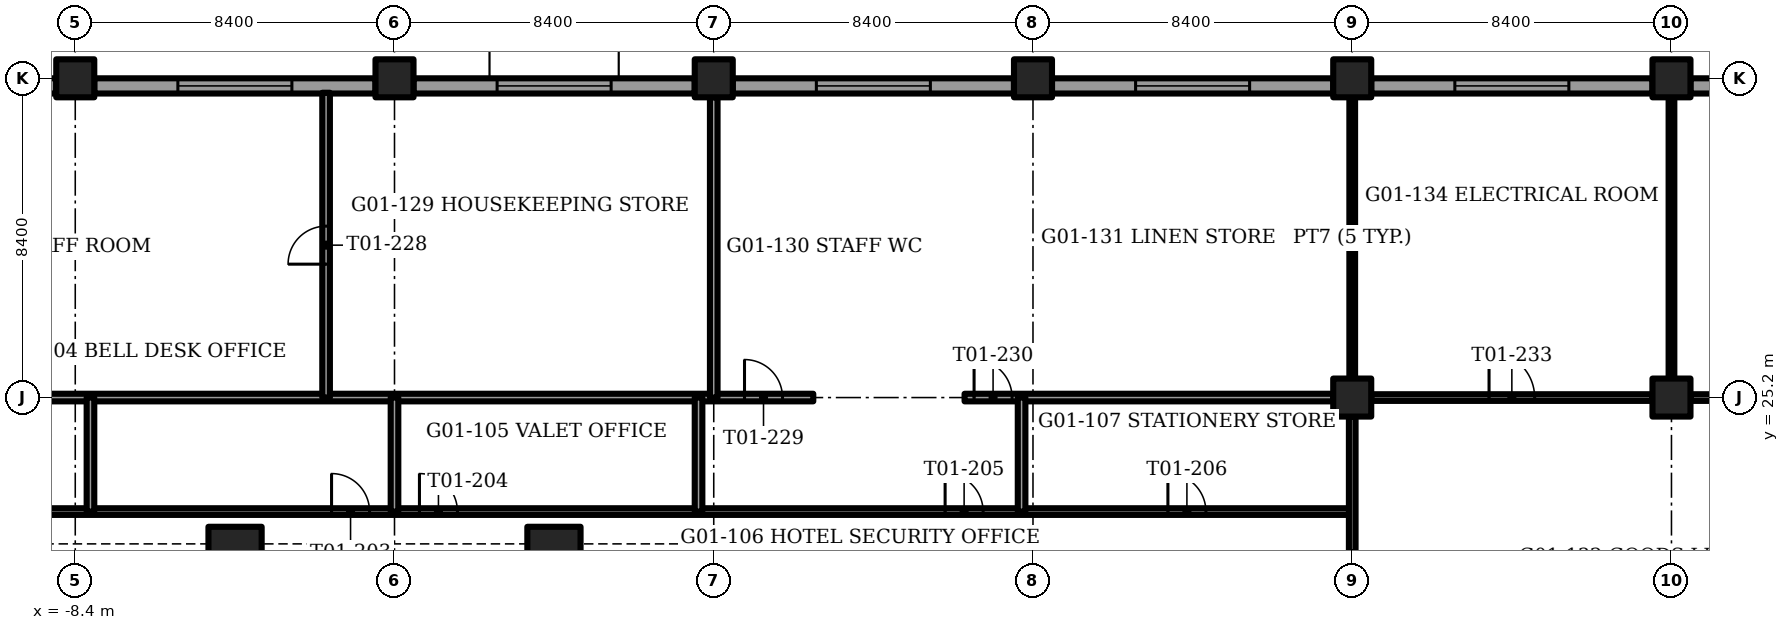
"""IFC4 building model, lengths in metres.
Left out: names, types, materials, properties, quantities, classifications, styles, units other than length and angle.
Written with IfcOpenShell. Run it as: python <this file> out.ifc"""

import sys

from ifc_helpers import new_model, si_unit, direction, frame, frame_2d, origin, origin_2d, place, context, subcontext, project, spatial, rectangle, circle, extrude, element, fill, save


model = new_model("IFC4")
c1 = context("Model", 3, precision=1e-05, world=origin(), true_north=direction((0.0, 1.0)))
c2 = subcontext(c1, "Body", "Model", "MODEL_VIEW")
j1 = project(units=[si_unit("LENGTHUNIT", "METRE"), si_unit("PLANEANGLEUNIT", "RADIAN")], contexts=[c1])
p1 = place(None, origin())
s1 = spatial("IfcSite", under=j1, at=p1, CompositionType="ELEMENT")
p2 = place(p1, origin())
s2 = spatial("IfcBuilding", under=s1, at=p2, CompositionType="ELEMENT")
p3 = place(p2, frame((0.0, 0.0, 6.0)))
s3 = spatial("IfcBuildingStorey", under=s2, at=p3, CompositionType="ELEMENT", Elevation=6.0)
for number, where, z_axis, x_axis in (
    (1, (-8.4, 33.6, -0.35), (0.0, 0.0, 1.0), (1.0, 0.0, 0.0)),
    (2, (0.0, 33.6, -0.35), (0.0, 0.0, 1.0), (1.0, 0.0, 0.0)),
    (3, (8.4, 33.6, -0.35), (0.0, 0.0, 1.0), (1.0, 0.0, 0.0)),
    (4, (16.8, 33.6, -0.35), (0.0, 0.0, 1.0), (1.0, 0.0, 0.0)),
    (5, (25.2, 25.2, -0.35), (0.0, 0.0, 1.0), (1.0, 0.0, 0.0)),
    (6, (25.2, 33.6, -0.35), (0.0, 0.0, 1.0), (1.0, 0.0, 0.0)),
    (7, (33.6, 25.2, -0.35), (0.0, 0.0, 1.0), (1.0, 0.0, 0.0)),
    (8, (33.6, 33.6, -0.35), (0.0, 0.0, 1.0), (1.0, 0.0, 0.0)),
):
    element("IfcColumn", number, at=place(p3, frame(where, z_axis=z_axis, x_axis=x_axis)), inside=s3, PredefinedType="COLUMN", context=c2, shape_type="SweptSolid", body=[
        extrude(rectangle(XDim=1.0, YDim=1.0, at=origin_2d()), origin(), (0.0, 0.0, 1.0), 4.0),
    ])
p4 = place(p3, frame((12.051, 20.872, -1.2), z_axis=(0.0, 0.0, 1.0), x_axis=(1.0, 0.0, 0.0)))
e9 = element("IfcColumn", 9, at=p4, inside=s3, PredefinedType="COLUMN", context=c2, shape_type="SweptSolid", body=[
    extrude(circle(Radius=0.7, at=origin_2d()), origin(), (0.0, 0.0, 1.0), 4.0),
])
for number, where, z_axis, x_axis in (
    (10, (4.195, 21.1, -1.2), (0.0, 0.0, 1.0), (1.0, 0.0, 0.0)),
    (11, (-4.195, 21.1, -1.2), (0.0, 0.0, 1.0), (1.0, 0.0, 0.0)),
):
    element("IfcColumn", number, at=place(p3, frame(where, z_axis=z_axis, x_axis=x_axis)), inside=s3, PredefinedType="COLUMN", context=c2, shape_type="SweptSolid", body=[
        extrude(rectangle(XDim=1.4, YDim=1.4, at=origin_2d()), origin(), (0.0, 0.0, 1.0), 4.0),
    ])
p5 = place(p3, frame((-16.3, 33.4, 0.0), z_axis=(0.0, 0.0, 1.0), x_axis=(1.0, 0.0, 0.0)))
e12 = element("IfcWall", 12, at=p5, inside=s3, PredefinedType="SOLIDWALL", context=c2, shape_type="SweptSolid", body=[
    extrude(rectangle(XDim=7.4, YDim=0.4, at=frame_2d((3.7, 0.0))), origin(), (0.0, 0.0, 1.0), 3.65),
])
p6 = place(p5, frame((2.2, 0.0, 1.0)))
e13 = element("IfcOpeningElement", 13, at=p6, cuts=e12, PredefinedType="OPENING", context=c2, shape_type="SweptSolid", body=[
    extrude(rectangle(XDim=3.0, YDim=2.2, at=frame_2d((1.5, 1.1))), frame((0.0, 0.2, 0.0), z_axis=(0.0, -1.0, 0.0), x_axis=(1.0, 0.0, 0.0)), (0.0, 0.0, 1.0), 0.4),
])
p7 = place(p3, frame((-7.9, 33.4, 0.0), z_axis=(0.0, 0.0, 1.0), x_axis=(1.0, 0.0, 0.0)))
e14 = element("IfcWall", 14, at=p7, inside=s3, PredefinedType="SOLIDWALL", context=c2, shape_type="SweptSolid", body=[
    extrude(rectangle(XDim=7.4, YDim=0.4, at=frame_2d((3.7, 0.0))), origin(), (0.0, 0.0, 1.0), 3.65),
])
p8 = place(p7, frame((2.2, 0.0, 1.0)))
e15 = element("IfcOpeningElement", 15, at=p8, cuts=e14, PredefinedType="OPENING", context=c2, shape_type="SweptSolid", body=[
    extrude(rectangle(XDim=3.0, YDim=2.2, at=frame_2d((1.5, 1.1))), frame((0.0, 0.2, 0.0), z_axis=(0.0, -1.0, 0.0), x_axis=(1.0, 0.0, 0.0)), (0.0, 0.0, 1.0), 0.4),
])
p9 = place(p3, frame((0.5, 33.4, 0.0), z_axis=(0.0, 0.0, 1.0), x_axis=(1.0, 0.0, 0.0)))
e16 = element("IfcWall", 16, at=p9, inside=s3, PredefinedType="SOLIDWALL", context=c2, shape_type="SweptSolid", body=[
    extrude(rectangle(XDim=7.4, YDim=0.4, at=frame_2d((3.7, 0.0))), origin(), (0.0, 0.0, 1.0), 3.65),
])
p10 = place(p9, frame((2.2, 0.0, 1.0)))
e17 = element("IfcOpeningElement", 17, at=p10, cuts=e16, PredefinedType="OPENING", context=c2, shape_type="SweptSolid", body=[
    extrude(rectangle(XDim=3.0, YDim=2.2, at=frame_2d((1.5, 1.1))), frame((0.0, 0.2, 0.0), z_axis=(0.0, -1.0, 0.0), x_axis=(1.0, 0.0, 0.0)), (0.0, 0.0, 1.0), 0.4),
])
p11 = place(p3, frame((8.9, 33.4, 0.0), z_axis=(0.0, 0.0, 1.0), x_axis=(1.0, 0.0, 0.0)))
e18 = element("IfcWall", 18, at=p11, inside=s3, PredefinedType="SOLIDWALL", context=c2, shape_type="SweptSolid", body=[
    extrude(rectangle(XDim=7.4, YDim=0.4, at=frame_2d((3.7, 0.0))), origin(), (0.0, 0.0, 1.0), 3.65),
])
p12 = place(p11, frame((2.2, 0.0, 1.0)))
e19 = element("IfcOpeningElement", 19, at=p12, cuts=e18, PredefinedType="OPENING", context=c2, shape_type="SweptSolid", body=[
    extrude(rectangle(XDim=3.0, YDim=2.2, at=frame_2d((1.5, 1.1))), frame((0.0, 0.2, 0.0), z_axis=(0.0, -1.0, 0.0), x_axis=(1.0, 0.0, 0.0)), (0.0, 0.0, 1.0), 0.4),
])
p13 = place(p3, frame((17.3, 33.4, 0.0), z_axis=(0.0, 0.0, 1.0), x_axis=(1.0, 0.0, 0.0)))
e20 = element("IfcWall", 20, at=p13, inside=s3, PredefinedType="SOLIDWALL", context=c2, shape_type="SweptSolid", body=[
    extrude(rectangle(XDim=7.4, YDim=0.4, at=frame_2d((3.7, 0.0))), origin(), (0.0, 0.0, 1.0), 3.65),
])
p14 = place(p13, frame((2.2, 0.0, 1.0)))
e21 = element("IfcOpeningElement", 21, at=p14, cuts=e20, PredefinedType="OPENING", context=c2, shape_type="SweptSolid", body=[
    extrude(rectangle(XDim=3.0, YDim=2.2, at=frame_2d((1.5, 1.1))), frame((0.0, 0.2, 0.0), z_axis=(0.0, -1.0, 0.0), x_axis=(1.0, 0.0, 0.0)), (0.0, 0.0, 1.0), 0.4),
])
p15 = place(p3, frame((25.7, 33.4, 0.0), z_axis=(0.0, 0.0, 1.0), x_axis=(1.0, 0.0, 0.0)))
e22 = element("IfcWall", 22, at=p15, inside=s3, PredefinedType="SOLIDWALL", context=c2, shape_type="SweptSolid", body=[
    extrude(rectangle(XDim=7.4, YDim=0.4, at=frame_2d((3.7, 0.0))), origin(), (0.0, 0.0, 1.0), 3.65),
])
p16 = place(p15, frame((2.2, 0.0, 1.0)))
e23 = element("IfcOpeningElement", 23, at=p16, cuts=e22, PredefinedType="OPENING", context=c2, shape_type="SweptSolid", body=[
    extrude(rectangle(XDim=3.0, YDim=2.2, at=frame_2d((1.5, 1.1))), frame((0.0, 0.2, 0.0), z_axis=(0.0, -1.0, 0.0), x_axis=(1.0, 0.0, 0.0)), (0.0, 0.0, 1.0), 0.4),
])
p17 = place(p3, frame((34.1, 33.4, 0.0), z_axis=(0.0, 0.0, 1.0), x_axis=(1.0, 0.0, 0.0)))
e24 = element("IfcWall", 24, at=p17, inside=s3, PredefinedType="SOLIDWALL", context=c2, shape_type="SweptSolid", body=[
    extrude(rectangle(XDim=7.4, YDim=0.4, at=frame_2d((3.7, 0.0))), origin(), (0.0, 0.0, 1.0), 3.65),
])
p18 = place(p17, frame((2.2, 0.0, 1.0)))
e25 = element("IfcOpeningElement", 25, at=p18, cuts=e24, PredefinedType="OPENING", context=c2, shape_type="SweptSolid", body=[
    extrude(rectangle(XDim=3.0, YDim=2.2, at=frame_2d((1.5, 1.1))), frame((0.0, 0.2, 0.0), z_axis=(0.0, -1.0, 0.0), x_axis=(1.0, 0.0, 0.0)), (0.0, 0.0, 1.0), 0.4),
])
p19 = place(p3, frame((-17.0, 22.2, 0.0), z_axis=(0.0, 0.0, 1.0), x_axis=(1.0, 0.0, 0.0)))
e26 = element("IfcWall", 26, at=p19, inside=s3, PredefinedType="PARTITIONING", context=c2, shape_type="SweptSolid", body=[
    extrude(rectangle(XDim=42.2, YDim=0.175, at=frame_2d((21.1, 0.0))), origin(), (0.0, 0.0, 1.0), 3.65),
])
p20 = place(p19, frame((1.262, 0.0, 0.0)))
e27 = element("IfcOpeningElement", 27, at=p20, cuts=e26, PredefinedType="OPENING", context=c2, shape_type="SweptSolid", body=[
    extrude(rectangle(XDim=1.0, YDim=2.1, at=frame_2d((0.5, 1.05))), frame((0.0, 0.087, 0.0), z_axis=(0.0, -1.0, 0.0), x_axis=(1.0, 0.0, 0.0)), (0.0, 0.0, 1.0), 0.175),
])
p21 = place(p19, frame((15.344, 0.0, 0.0)))
e28 = element("IfcOpeningElement", 28, at=p21, cuts=e26, PredefinedType="OPENING", context=c2, shape_type="SweptSolid", body=[
    extrude(rectangle(XDim=1.0, YDim=2.1, at=frame_2d((0.5, 1.05))), frame((0.0, 0.087, 0.0), z_axis=(0.0, -1.0, 0.0), x_axis=(1.0, 0.0, 0.0)), (0.0, 0.0, 1.0), 0.175),
])
p22 = place(p19, frame((17.656, 0.0, 0.0)))
e29 = element("IfcOpeningElement", 29, at=p22, cuts=e26, PredefinedType="OPENING", context=c2, shape_type="SweptSolid", body=[
    extrude(rectangle(XDim=1.0, YDim=2.1, at=frame_2d((0.5, 1.05))), frame((0.0, 0.087, 0.0), z_axis=(0.0, -1.0, 0.0), x_axis=(1.0, 0.0, 0.0)), (0.0, 0.0, 1.0), 0.175),
])
p23 = place(p19, frame((31.488, 0.0, 0.0)))
e30 = element("IfcOpeningElement", 30, at=p23, cuts=e26, PredefinedType="OPENING", context=c2, shape_type="SweptSolid", body=[
    extrude(rectangle(XDim=1.0, YDim=2.1, at=frame_2d((0.5, 1.05))), frame((0.0, 0.087, 0.0), z_axis=(0.0, -1.0, 0.0), x_axis=(1.0, 0.0, 0.0)), (0.0, 0.0, 1.0), 0.175),
])
p24 = place(p19, frame((37.35, 0.0, 0.0)))
e31 = element("IfcOpeningElement", 31, at=p24, cuts=e26, PredefinedType="OPENING", context=c2, shape_type="SweptSolid", body=[
    extrude(rectangle(XDim=1.0, YDim=2.1, at=frame_2d((0.5, 1.05))), frame((0.0, 0.087, 0.0), z_axis=(0.0, -1.0, 0.0), x_axis=(1.0, 0.0, 0.0)), (0.0, 0.0, 1.0), 0.175),
])
p25 = place(p3, frame((25.7, 25.2, 0.0), z_axis=(0.0, 0.0, 1.0), x_axis=(1.0, 0.0, 0.0)))
e32 = element("IfcWall", 32, at=p25, inside=s3, PredefinedType="PARTITIONING", context=c2, shape_type="SweptSolid", body=[
    extrude(rectangle(XDim=7.4, YDim=0.175, at=frame_2d((3.7, 0.0))), origin(), (0.0, 0.0, 1.0), 3.65),
])
p26 = place(p25, frame((3.1, 0.0, 0.0)))
e33 = element("IfcOpeningElement", 33, at=p26, cuts=e32, PredefinedType="OPENING", context=c2, shape_type="SweptSolid", body=[
    extrude(rectangle(XDim=1.2, YDim=2.1, at=frame_2d((0.6, 1.05))), frame((0.0, 0.087, 0.0), z_axis=(0.0, -1.0, 0.0), x_axis=(1.0, 0.0, 0.0)), (0.0, 0.0, 1.0), 0.175),
])
p27 = place(p3, frame((34.1, 25.2, 0.0), z_axis=(0.0, 0.0, 1.0), x_axis=(1.0, 0.0, 0.0)))
e34 = element("IfcWall", 34, at=p27, inside=s3, PredefinedType="PARTITIONING", context=c2, shape_type="SweptSolid", body=[
    extrude(rectangle(XDim=7.4, YDim=0.175, at=frame_2d((3.7, 0.0))), origin(), (0.0, 0.0, 1.0), 3.65),
])
p28 = place(p27, frame((3.1, 0.0, 0.0)))
e35 = element("IfcOpeningElement", 35, at=p28, cuts=e34, PredefinedType="OPENING", context=c2, shape_type="SweptSolid", body=[
    extrude(rectangle(XDim=1.2, YDim=2.1, at=frame_2d((0.6, 1.05))), frame((0.0, 0.087, 0.0), z_axis=(0.0, -1.0, 0.0), x_axis=(1.0, 0.0, 0.0)), (0.0, 0.0, 1.0), 0.175),
])
p29 = place(p3, frame((25.2, 17.3, 0.0), z_axis=(0.0, 0.0, 1.0), x_axis=(0.0, 1.0, 0.0)))
e36 = element("IfcWall", 36, at=p29, inside=s3, PredefinedType="PARTITIONING", context=c2, shape_type="SweptSolid", body=[
    extrude(rectangle(XDim=7.4, YDim=0.175, at=frame_2d((3.7, 0.0))), origin(), (0.0, 0.0, 1.0), 3.65),
])
p30 = place(p29, frame((2.275, 0.0, 0.0)))
e37 = element("IfcOpeningElement", 37, at=p30, cuts=e36, PredefinedType="OPENING", context=c2, shape_type="SweptSolid", body=[
    extrude(rectangle(XDim=1.6, YDim=2.1, at=frame_2d((0.8, 1.05))), frame((0.0, 0.087, 0.0), z_axis=(0.0, -1.0, 0.0), x_axis=(1.0, 0.0, 0.0)), (0.0, 0.0, 1.0), 0.175),
])
p31 = place(p3, frame((-17.0, 25.2, 0.0), z_axis=(0.0, 0.0, 1.0), x_axis=(1.0, 0.0, 0.0)))
e38 = element("IfcWall", 38, at=p31, inside=s3, PredefinedType="PARTITIONING", context=c2, shape_type="SweptSolid", body=[
    extrude(rectangle(XDim=28.019, YDim=0.2, at=frame_2d((14.01, 0.0))), origin(), (0.0, 0.0, 1.0), 3.65),
])
p32 = place(p31, frame((26.209, 0.0, 0.0)))
e39 = element("IfcOpeningElement", 39, at=p32, cuts=e38, PredefinedType="OPENING", context=c2, shape_type="SweptSolid", body=[
    extrude(rectangle(XDim=1.0, YDim=2.1, at=frame_2d((0.5, 1.05))), frame((0.0, 0.1, 0.0), z_axis=(0.0, -1.0, 0.0), x_axis=(1.0, 0.0, 0.0)), (0.0, 0.0, 1.0), 0.2),
])
p33 = place(p3, frame((15.0, 25.2, 0.0), z_axis=(0.0, 0.0, 1.0), x_axis=(1.0, 0.0, 0.0)))
e40 = element("IfcWall", 40, at=p33, inside=s3, PredefinedType="PARTITIONING", context=c2, shape_type="SweptSolid", body=[
    extrude(rectangle(XDim=9.7, YDim=0.2, at=frame_2d((4.85, 0.0))), origin(), (0.0, 0.0, 1.0), 3.65),
])
p34 = place(p33, frame((0.25, 0.0, 0.0)))
e41 = element("IfcOpeningElement", 41, at=p34, cuts=e40, PredefinedType="OPENING", context=c2, shape_type="SweptSolid", body=[
    extrude(rectangle(XDim=1.0, YDim=2.1, at=frame_2d((0.5, 1.05))), frame((0.0, 0.1, 0.0), z_axis=(0.0, -1.0, 0.0), x_axis=(1.0, 0.0, 0.0)), (0.0, 0.0, 1.0), 0.2),
])
p35 = place(p3, frame((-8.0, 22.2, 0.0), z_axis=(0.0, 0.0, 1.0), x_axis=(0.0, 1.0, 0.0)))
e42 = element("IfcWall", 42, at=p35, inside=s3, PredefinedType="PARTITIONING", context=c2, shape_type="SweptSolid", body=[
    extrude(rectangle(XDim=3.0, YDim=0.2, at=frame_2d((1.5, 0.0))), origin(), (0.0, 0.0, 1.0), 3.65),
])
p36 = place(p3, frame((-1.8, 25.2, 0.0), z_axis=(0.0, 0.0, 1.0), x_axis=(0.0, 1.0, 0.0)))
e43 = element("IfcWall", 43, at=p36, inside=s3, PredefinedType="PARTITIONING", context=c2, shape_type="SweptSolid", body=[
    extrude(rectangle(XDim=8.02, YDim=0.2, at=frame_2d((4.01, 0.0))), origin(), (0.0, 0.0, 1.0), 3.65),
])
p37 = place(p36, frame((3.51, 0.0, 0.0)))
e44 = element("IfcOpeningElement", 44, at=p37, cuts=e43, PredefinedType="OPENING", context=c2, shape_type="SweptSolid", body=[
    extrude(rectangle(XDim=1.0, YDim=2.1, at=frame_2d((0.5, 1.05))), frame((0.0, 0.1, 0.0), z_axis=(0.0, -1.0, 0.0), x_axis=(1.0, 0.0, 0.0)), (0.0, 0.0, 1.0), 0.2),
])
for number, where, z_axis, x_axis in (
    (45, (0.0, 22.2, 0.0), (0.0, 0.0, 1.0), (0.0, 1.0, 0.0)),
    (46, (8.0, 22.2, 0.0), (0.0, 0.0, 1.0), (0.0, 1.0, 0.0)),
):
    element("IfcWall", number, at=place(p3, frame(where, z_axis=z_axis, x_axis=x_axis)), inside=s3, PredefinedType="PARTITIONING", context=c2, shape_type="SweptSolid", body=[
        extrude(rectangle(XDim=3.0, YDim=0.2, at=frame_2d((1.5, 0.0))), origin(), (0.0, 0.0, 1.0), 3.65),
    ])
p38 = place(p3, frame((8.4, 25.2, 0.0), z_axis=(0.0, 0.0, 1.0), x_axis=(0.0, 1.0, 0.0)))
e47 = element("IfcWall", 47, at=p38, inside=s3, PredefinedType="PARTITIONING", context=c2, shape_type="SweptSolid", body=[
    extrude(rectangle(XDim=7.9, YDim=0.2, at=frame_2d((3.95, 0.0))), origin(), (0.0, 0.0, 1.0), 3.65),
])
p39 = place(p3, frame((16.5, 22.2, 0.0), z_axis=(0.0, 0.0, 1.0), x_axis=(0.0, 1.0, 0.0)))
e48 = element("IfcWall", 48, at=p39, inside=s3, PredefinedType="PARTITIONING", context=c2, shape_type="SweptSolid", body=[
    extrude(rectangle(XDim=3.0, YDim=0.2, at=frame_2d((1.5, 0.0))), origin(), (0.0, 0.0, 1.0), 3.65),
])
for number, where, z_axis, x_axis in (
    (49, (25.2, 25.7, 0.0), (0.0, 0.0, 1.0), (0.0, 1.0, 0.0)),
    (50, (33.6, 25.7, 0.0), (0.0, 0.0, 1.0), (0.0, 1.0, 0.0)),
):
    element("IfcWall", number, at=place(p3, frame(where, z_axis=z_axis, x_axis=x_axis)), inside=s3, PredefinedType="PARTITIONING", context=c2, shape_type="SweptSolid", body=[
        extrude(rectangle(XDim=7.4, YDim=0.15, at=frame_2d((3.7, 0.0))), origin(), (0.0, 0.0, 1.0), 3.65),
    ])
p40 = place(p8, origin())
e51 = element("IfcWindow", 51, at=p40, inside=s3, PartitioningType="SINGLE_PANEL", PredefinedType="WINDOW", context=c2, shape_type="SweptSolid", body=[
    extrude(rectangle(XDim=3.0, YDim=2.2, at=frame_2d((1.5, 1.1))), frame((0.0, 0.03, 0.0), z_axis=(0.0, -1.0, 0.0), x_axis=(1.0, 0.0, 0.0)), (0.0, 0.0, 1.0), 0.06),
])
fill(e15, e51)
p41 = place(p10, origin())
e52 = element("IfcWindow", 52, at=p41, inside=s3, PartitioningType="SINGLE_PANEL", PredefinedType="WINDOW", context=c2, shape_type="SweptSolid", body=[
    extrude(rectangle(XDim=3.0, YDim=2.2, at=frame_2d((1.5, 1.1))), frame((0.0, 0.03, 0.0), z_axis=(0.0, -1.0, 0.0), x_axis=(1.0, 0.0, 0.0)), (0.0, 0.0, 1.0), 0.06),
])
fill(e17, e52)
p42 = place(p12, origin())
e53 = element("IfcWindow", 53, at=p42, inside=s3, PartitioningType="SINGLE_PANEL", PredefinedType="WINDOW", context=c2, shape_type="SweptSolid", body=[
    extrude(rectangle(XDim=3.0, YDim=2.2, at=frame_2d((1.5, 1.1))), frame((0.0, 0.03, 0.0), z_axis=(0.0, -1.0, 0.0), x_axis=(1.0, 0.0, 0.0)), (0.0, 0.0, 1.0), 0.06),
])
fill(e19, e53)
p43 = place(p14, origin())
e54 = element("IfcWindow", 54, at=p43, inside=s3, PartitioningType="SINGLE_PANEL", PredefinedType="WINDOW", context=c2, shape_type="SweptSolid", body=[
    extrude(rectangle(XDim=3.0, YDim=2.2, at=frame_2d((1.5, 1.1))), frame((0.0, 0.03, 0.0), z_axis=(0.0, -1.0, 0.0), x_axis=(1.0, 0.0, 0.0)), (0.0, 0.0, 1.0), 0.06),
])
fill(e21, e54)
p44 = place(p16, origin())
e55 = element("IfcWindow", 55, at=p44, inside=s3, PartitioningType="SINGLE_PANEL", PredefinedType="WINDOW", context=c2, shape_type="SweptSolid", body=[
    extrude(rectangle(XDim=3.0, YDim=2.2, at=frame_2d((1.5, 1.1))), frame((0.0, 0.03, 0.0), z_axis=(0.0, -1.0, 0.0), x_axis=(1.0, 0.0, 0.0)), (0.0, 0.0, 1.0), 0.06),
])
fill(e23, e55)
p45 = place(p21, origin())
e56 = element("IfcDoor", 56, at=p45, inside=s3, OperationType="SINGLE_SWING_LEFT", PredefinedType="DOOR", context=c2, shape_type="SweptSolid", body=[
    extrude(rectangle(XDim=1.0, YDim=2.1, at=frame_2d((0.5, 1.05))), frame((0.0, 0.025, 0.0), z_axis=(0.0, -1.0, 0.0), x_axis=(1.0, 0.0, 0.0)), (0.0, 0.0, 1.0), 0.05),
])
fill(e28, e56)
p46 = place(p22, origin())
e57 = element("IfcDoor", 57, at=p46, inside=s3, OperationType="SINGLE_SWING_RIGHT", PredefinedType="DOOR", context=c2, shape_type="SweptSolid", body=[
    extrude(rectangle(XDim=1.0, YDim=2.1, at=frame_2d((0.5, 1.05))), frame((0.0, 0.025, 0.0), z_axis=(0.0, -1.0, 0.0), x_axis=(1.0, 0.0, 0.0)), (0.0, 0.0, 1.0), 0.05),
])
fill(e29, e57)
p47 = place(p23, origin())
e58 = element("IfcDoor", 58, at=p47, inside=s3, OperationType="SINGLE_SWING_LEFT", PredefinedType="DOOR", context=c2, shape_type="SweptSolid", body=[
    extrude(rectangle(XDim=1.0, YDim=2.1, at=frame_2d((0.5, 1.05))), frame((0.0, 0.025, 0.0), z_axis=(0.0, -1.0, 0.0), x_axis=(1.0, 0.0, 0.0)), (0.0, 0.0, 1.0), 0.05),
])
fill(e30, e58)
p48 = place(p24, origin())
e59 = element("IfcDoor", 59, at=p48, inside=s3, OperationType="SINGLE_SWING_RIGHT", PredefinedType="DOOR", context=c2, shape_type="SweptSolid", body=[
    extrude(rectangle(XDim=1.0, YDim=2.1, at=frame_2d((0.5, 1.05))), frame((0.0, 0.025, 0.0), z_axis=(0.0, -1.0, 0.0), x_axis=(1.0, 0.0, 0.0)), (0.0, 0.0, 1.0), 0.05),
])
fill(e31, e59)
p49 = place(p37, origin())
e60 = element("IfcDoor", 60, at=p49, inside=s3, OperationType="SINGLE_SWING_RIGHT", PredefinedType="DOOR", context=c2, shape_type="SweptSolid", body=[
    extrude(rectangle(XDim=1.0, YDim=2.1, at=frame_2d((0.5, 1.05))), frame((0.0, 0.025, 0.0), z_axis=(0.0, -1.0, 0.0), x_axis=(1.0, 0.0, 0.0)), (0.0, 0.0, 1.0), 0.05),
])
fill(e44, e60)
p50 = place(p32, origin())
e61 = element("IfcDoor", 61, at=p50, inside=s3, OperationType="SINGLE_SWING_LEFT", PredefinedType="DOOR", context=c2, shape_type="SweptSolid", body=[
    extrude(rectangle(XDim=1.0, YDim=2.1, at=frame_2d((0.5, 1.05))), frame((0.0, 0.025, 0.0), z_axis=(0.0, -1.0, 0.0), x_axis=(1.0, 0.0, 0.0)), (0.0, 0.0, 1.0), 0.05),
])
fill(e39, e61)
p51 = place(p34, origin())
e62 = element("IfcDoor", 62, at=p51, inside=s3, OperationType="SINGLE_SWING_RIGHT", PredefinedType="DOOR", context=c2, shape_type="SweptSolid", body=[
    extrude(rectangle(XDim=1.0, YDim=2.1, at=frame_2d((0.5, 1.05))), frame((0.0, 0.025, 0.0), z_axis=(0.0, -1.0, 0.0), x_axis=(1.0, 0.0, 0.0)), (0.0, 0.0, 1.0), 0.05),
])
fill(e41, e62)
p52 = place(p26, origin())
e63 = element("IfcDoor", 63, at=p52, inside=s3, OperationType="SINGLE_SWING_LEFT", PredefinedType="DOOR", context=c2, shape_type="SweptSolid", body=[
    extrude(rectangle(XDim=1.2, YDim=2.1, at=frame_2d((0.6, 1.05))), frame((0.0, 0.025, 0.0), z_axis=(0.0, -1.0, 0.0), x_axis=(1.0, 0.0, 0.0)), (0.0, 0.0, 1.0), 0.05),
])
fill(e33, e63)
save(model, sys.argv[1])
